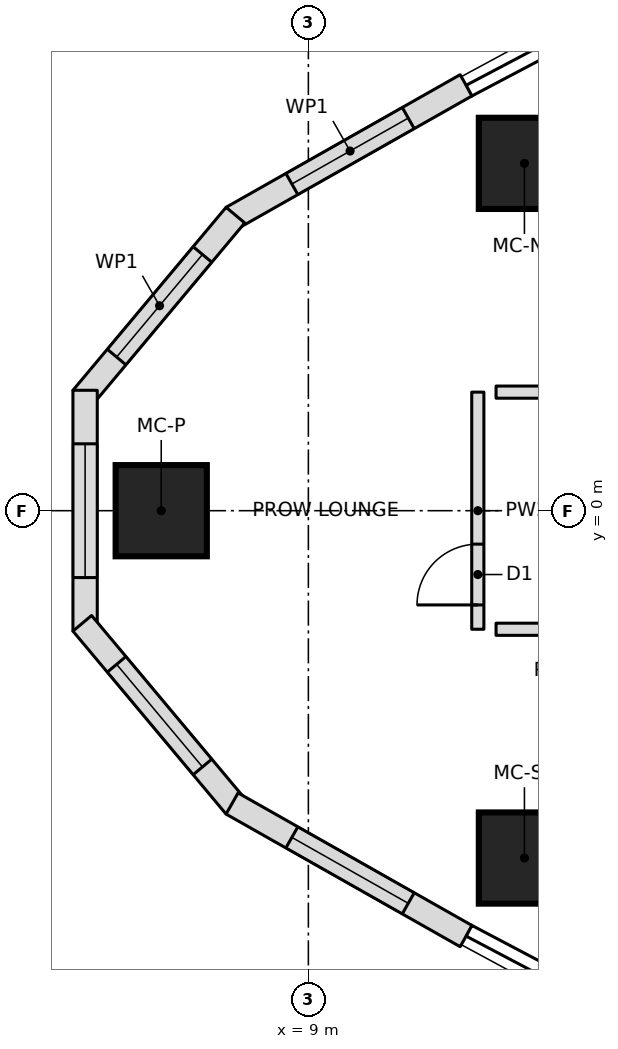
"""IFC4 building model, lengths in metres.
Left out: names, types, materials, properties, quantities, classifications, styles, units other than length and angle.
Written with IfcOpenShell. Run it as: python <this file> out.ifc"""

import sys

from ifc_helpers import new_model, si_unit, direction, frame, frame_2d, origin, origin_2d, place, context, subcontext, project, spatial, polyline, rectangle, outline, extrude, element, fill, save


model = new_model("IFC4")
c1 = context("Model", 3, precision=1e-05, world=origin(), true_north=direction((0.0, 1.0)))
c2 = subcontext(c1, "Body", "Model", "MODEL_VIEW")
j1 = project(units=[si_unit("LENGTHUNIT", "METRE"), si_unit("PLANEANGLEUNIT", "RADIAN")], contexts=[c1])
p1 = place(None, origin())
s1 = spatial("IfcSite", under=j1, at=p1, CompositionType="ELEMENT")
p2 = place(p1, origin())
s2 = spatial("IfcBuilding", under=s1, at=p2, CompositionType="ELEMENT")
p3 = place(p2, frame((0.0, 0.0, 158.6)))
s3 = spatial("IfcBuildingStorey", under=s2, at=p3, CompositionType="ELEMENT", Elevation=158.6)
for number, where, z_axis, x_axis in (
    (1, (6.58, 0.0, 0.0), (0.0, 0.0, 1.0), (1.0, 0.0, 0.0)),
    (2, (12.553, -5.713, 0.0), (0.0, 0.0, 1.0), (1.0, 0.0, 0.0)),
    (3, (12.553, 5.713, 0.0), (0.0, 0.0, 1.0), (1.0, 0.0, 0.0)),
):
    element("IfcColumn", number, at=place(p3, frame(where, z_axis=z_axis, x_axis=x_axis)), inside=s3, PredefinedType="COLUMN", context=c2, shape_type="SweptSolid", body=[
        extrude(rectangle(XDim=1.5, YDim=1.5, at=origin_2d()), origin(), (0.0, 0.0, 1.0), 3.55),
    ])
p4 = place(p3, frame((11.594, 6.997, 0.0), z_axis=(0.0, 0.0, 1.0), x_axis=(-0.870045255208, -0.492971859125, 0.0)))
e4 = element("IfcWall", 4, at=p4, inside=s3, PredefinedType="NOTDEFINED", context=c2, shape_type="SweptSolid", body=[
    extrude(outline(polyline([(0.0, -0.2), (4.424, -0.2), (4.352, 0.2), (0.0, 0.2), (0.0, -0.2)])), origin(), (0.0, 0.0, 1.0), 3.25),
])
p5 = place(p4, frame((1.094, 0.0, 0.6)))
e5 = element("IfcOpeningElement", 5, at=p5, cuts=e4, PredefinedType="OPENING", context=c2, shape_type="SweptSolid", body=[
    extrude(outline(polyline([(0.0, 1.35), (0.084, 1.771), (0.322, 2.128), (0.679, 2.366), (1.1, 2.45), (1.521, 2.366), (1.878, 2.128), (2.116, 1.771), (2.2, 1.35), (2.2, 1.1), (2.116, 0.679), (1.878, 0.322), (1.521, 0.084), (1.1, 0.0), (0.679, 0.084), (0.322, 0.322), (0.084, 0.679), (0.0, 1.1), (0.0, 1.35)])), frame((0.0, 0.21, 0.0), z_axis=(0.0, -1.0, 0.0), x_axis=(1.0, 0.0, 0.0)), (0.0, 0.0, 1.0), 0.42),
])
p6 = place(p3, frame((7.777, 4.834, 0.0), z_axis=(0.0, 0.0, 1.0), x_axis=(-0.641787918235, -0.766882173484, 0.0)))
e6 = element("IfcWall", 6, at=p6, inside=s3, PredefinedType="NOTDEFINED", context=c2, shape_type="SweptSolid", body=[
    extrude(outline(polyline([(-0.036, -0.2), (3.888, -0.2), (3.743, 0.2), (0.036, 0.2), (-0.036, -0.2)])), origin(), (0.0, 0.0, 1.0), 3.25),
])
p7 = place(p6, frame((0.808, 0.0, 0.6)))
e7 = element("IfcOpeningElement", 7, at=p7, cuts=e6, PredefinedType="OPENING", context=c2, shape_type="SweptSolid", body=[
    extrude(outline(polyline([(0.0, 1.35), (0.084, 1.771), (0.322, 2.128), (0.679, 2.366), (1.1, 2.45), (1.521, 2.366), (1.878, 2.128), (2.116, 1.771), (2.2, 1.35), (2.2, 1.1), (2.116, 0.679), (1.878, 0.322), (1.521, 0.084), (1.1, 0.0), (0.679, 0.084), (0.322, 0.322), (0.084, 0.679), (0.0, 1.1), (0.0, 1.35)])), frame((0.0, 0.21, 0.0), z_axis=(0.0, -1.0, 0.0), x_axis=(1.0, 0.0, 0.0)), (0.0, 0.0, 1.0), 0.42),
])
p8 = place(p3, frame((5.328, 1.908, 0.0), z_axis=(0.0, 0.0, 1.0), x_axis=(0.0, -1.0, 0.0)))
e8 = element("IfcWall", 8, at=p8, inside=s3, PredefinedType="NOTDEFINED", context=c2, shape_type="SweptSolid", body=[
    extrude(outline(polyline([(-0.073, -0.2), (3.888, -0.2), (3.743, 0.2), (0.073, 0.2), (-0.073, -0.2)])), origin(), (0.0, 0.0, 1.0), 3.25),
])
p9 = place(p8, frame((0.808, 0.0, 0.6)))
e9 = element("IfcOpeningElement", 9, at=p9, cuts=e8, PredefinedType="OPENING", context=c2, shape_type="SweptSolid", body=[
    extrude(outline(polyline([(0.0, 1.35), (0.084, 1.771), (0.322, 2.128), (0.679, 2.366), (1.1, 2.45), (1.521, 2.366), (1.878, 2.128), (2.116, 1.771), (2.2, 1.35), (2.2, 1.1), (2.116, 0.679), (1.878, 0.322), (1.521, 0.084), (1.1, 0.0), (0.679, 0.084), (0.322, 0.322), (0.084, 0.679), (0.0, 1.1), (0.0, 1.35)])), frame((0.0, 0.21, 0.0), z_axis=(0.0, -1.0, 0.0), x_axis=(1.0, 0.0, 0.0)), (0.0, 0.0, 1.0), 0.42),
])
p10 = place(p3, frame((5.328, -1.908, 0.0), z_axis=(0.0, 0.0, 1.0), x_axis=(0.641787918235, -0.766882173484, 0.0)))
e10 = element("IfcWall", 10, at=p10, inside=s3, PredefinedType="NOTDEFINED", context=c2, shape_type="SweptSolid", body=[
    extrude(outline(polyline([(-0.073, -0.2), (3.852, -0.2), (3.779, 0.2), (0.073, 0.2), (-0.073, -0.2)])), origin(), (0.0, 0.0, 1.0), 3.25),
])
p11 = place(p10, frame((0.808, 0.0, 0.6)))
e11 = element("IfcOpeningElement", 11, at=p11, cuts=e10, PredefinedType="OPENING", context=c2, shape_type="SweptSolid", body=[
    extrude(outline(polyline([(0.0, 1.35), (0.084, 1.771), (0.322, 2.128), (0.679, 2.366), (1.1, 2.45), (1.521, 2.366), (1.878, 2.128), (2.116, 1.771), (2.2, 1.35), (2.2, 1.1), (2.116, 0.679), (1.878, 0.322), (1.521, 0.084), (1.1, 0.0), (0.679, 0.084), (0.322, 0.322), (0.084, 0.679), (0.0, 1.1), (0.0, 1.35)])), frame((0.0, 0.21, 0.0), z_axis=(0.0, -1.0, 0.0), x_axis=(1.0, 0.0, 0.0)), (0.0, 0.0, 1.0), 0.42),
])
p12 = place(p3, frame((7.777, -4.834, 0.0), z_axis=(0.0, 0.0, 1.0), x_axis=(0.870045255208, -0.492971859125, 0.0)))
e12 = element("IfcWall", 12, at=p12, inside=s3, PredefinedType="NOTDEFINED", context=c2, shape_type="SweptSolid", body=[
    extrude(outline(polyline([(-0.036, -0.2), (4.388, -0.2), (4.388, 0.2), (0.036, 0.2), (-0.036, -0.2)])), origin(), (0.0, 0.0, 1.0), 3.25),
])
p13 = place(p12, frame((1.094, 0.0, 0.6)))
e13 = element("IfcOpeningElement", 13, at=p13, cuts=e12, PredefinedType="OPENING", context=c2, shape_type="SweptSolid", body=[
    extrude(outline(polyline([(0.0, 1.35), (0.084, 1.771), (0.322, 2.128), (0.679, 2.366), (1.1, 2.45), (1.521, 2.366), (1.878, 2.128), (2.116, 1.771), (2.2, 1.35), (2.2, 1.1), (2.116, 0.679), (1.878, 0.322), (1.521, 0.084), (1.1, 0.0), (0.679, 0.084), (0.322, 0.322), (0.084, 0.679), (0.0, 1.1), (0.0, 1.35)])), frame((0.0, 0.21, 0.0), z_axis=(0.0, -1.0, 0.0), x_axis=(1.0, 0.0, 0.0)), (0.0, 0.0, 1.0), 0.42),
])
p14 = place(p3, frame((12.087, 1.95, 0.0), z_axis=(0.0, 0.0, 1.0), x_axis=(1.0, 0.0, 0.0)))
e14 = element("IfcWall", 14, at=p14, inside=s3, PredefinedType="PARTITIONING", context=c2, shape_type="SweptSolid", body=[
    extrude(rectangle(XDim=3.372, YDim=0.2, at=frame_2d((1.686, 0.0))), origin(), (0.0, 0.0, 1.0), 3.25),
])
p15 = place(p14, frame((1.186, 0.0, 0.0)))
e15 = element("IfcOpeningElement", 15, at=p15, cuts=e14, PredefinedType="OPENING", context=c2, shape_type="SweptSolid", body=[
    extrude(rectangle(XDim=1.0, YDim=2.1, at=frame_2d((0.5, 1.05))), frame((0.0, 0.11, 0.0), z_axis=(0.0, -1.0, 0.0), x_axis=(1.0, 0.0, 0.0)), (0.0, 0.0, 1.0), 0.22),
])
p16 = place(p3, frame((12.087, -1.95, 0.0), z_axis=(0.0, 0.0, 1.0), x_axis=(1.0, 0.0, 0.0)))
e16 = element("IfcWall", 16, at=p16, inside=s3, PredefinedType="PARTITIONING", context=c2, shape_type="SweptSolid", body=[
    extrude(rectangle(XDim=3.372, YDim=0.2, at=frame_2d((1.686, 0.0))), origin(), (0.0, 0.0, 1.0), 3.25),
])
p17 = place(p16, frame((1.186, 0.0, 0.0)))
e17 = element("IfcOpeningElement", 17, at=p17, cuts=e16, PredefinedType="OPENING", context=c2, shape_type="SweptSolid", body=[
    extrude(rectangle(XDim=1.0, YDim=2.1, at=frame_2d((0.5, 1.05))), frame((0.0, 0.11, 0.0), z_axis=(0.0, -1.0, 0.0), x_axis=(1.0, 0.0, 0.0)), (0.0, 0.0, 1.0), 0.22),
])
p18 = place(p3, frame((11.787, -1.95, 0.0), z_axis=(0.0, 0.0, 1.0), x_axis=(0.0, 1.0, 0.0)))
e18 = element("IfcWall", 18, at=p18, inside=s3, PredefinedType="PARTITIONING", context=c2, shape_type="SweptSolid", body=[
    extrude(rectangle(XDim=3.9, YDim=0.2, at=frame_2d((1.95, 0.0))), origin(), (0.0, 0.0, 1.0), 3.25),
])
p19 = place(p18, frame((0.4, 0.0, 0.0)))
e19 = element("IfcOpeningElement", 19, at=p19, cuts=e18, PredefinedType="OPENING", context=c2, shape_type="SweptSolid", body=[
    extrude(rectangle(XDim=1.0, YDim=2.1, at=frame_2d((0.5, 1.05))), frame((0.0, 0.11, 0.0), z_axis=(0.0, -1.0, 0.0), x_axis=(1.0, 0.0, 0.0)), (0.0, 0.0, 1.0), 0.22),
])
p20 = place(p5, origin())
e20 = element("IfcWindow", 20, at=p20, inside=s3, PartitioningType="SINGLE_PANEL", PredefinedType="WINDOW", context=c2, shape_type="SweptSolid", body=[
    extrude(outline(polyline([(0.0, 1.35), (0.084, 1.771), (0.322, 2.128), (0.679, 2.366), (1.1, 2.45), (1.521, 2.366), (1.878, 2.128), (2.116, 1.771), (2.2, 1.35), (2.2, 1.1), (2.116, 0.679), (1.878, 0.322), (1.521, 0.084), (1.1, 0.0), (0.679, 0.084), (0.322, 0.322), (0.084, 0.679), (0.0, 1.1), (0.0, 1.35)])), frame((0.0, 0.17, 0.0), z_axis=(0.0, -1.0, 0.0), x_axis=(1.0, 0.0, 0.0)), (0.0, 0.0, 1.0), 0.06),
])
fill(e5, e20)
p21 = place(p7, origin())
e21 = element("IfcWindow", 21, at=p21, inside=s3, PartitioningType="SINGLE_PANEL", PredefinedType="WINDOW", context=c2, shape_type="SweptSolid", body=[
    extrude(outline(polyline([(0.0, 1.35), (0.084, 1.771), (0.322, 2.128), (0.679, 2.366), (1.1, 2.45), (1.521, 2.366), (1.878, 2.128), (2.116, 1.771), (2.2, 1.35), (2.2, 1.1), (2.116, 0.679), (1.878, 0.322), (1.521, 0.084), (1.1, 0.0), (0.679, 0.084), (0.322, 0.322), (0.084, 0.679), (0.0, 1.1), (0.0, 1.35)])), frame((0.0, 0.17, 0.0), z_axis=(0.0, -1.0, 0.0), x_axis=(1.0, 0.0, 0.0)), (0.0, 0.0, 1.0), 0.06),
])
fill(e7, e21)
p22 = place(p9, origin())
e22 = element("IfcWindow", 22, at=p22, inside=s3, PartitioningType="SINGLE_PANEL", PredefinedType="WINDOW", context=c2, shape_type="SweptSolid", body=[
    extrude(outline(polyline([(0.0, 1.35), (0.084, 1.771), (0.322, 2.128), (0.679, 2.366), (1.1, 2.45), (1.521, 2.366), (1.878, 2.128), (2.116, 1.771), (2.2, 1.35), (2.2, 1.1), (2.116, 0.679), (1.878, 0.322), (1.521, 0.084), (1.1, 0.0), (0.679, 0.084), (0.322, 0.322), (0.084, 0.679), (0.0, 1.1), (0.0, 1.35)])), frame((0.0, 0.17, 0.0), z_axis=(0.0, -1.0, 0.0), x_axis=(1.0, 0.0, 0.0)), (0.0, 0.0, 1.0), 0.06),
])
fill(e9, e22)
p23 = place(p11, origin())
e23 = element("IfcWindow", 23, at=p23, inside=s3, PartitioningType="SINGLE_PANEL", PredefinedType="WINDOW", context=c2, shape_type="SweptSolid", body=[
    extrude(outline(polyline([(0.0, 1.35), (0.084, 1.771), (0.322, 2.128), (0.679, 2.366), (1.1, 2.45), (1.521, 2.366), (1.878, 2.128), (2.116, 1.771), (2.2, 1.35), (2.2, 1.1), (2.116, 0.679), (1.878, 0.322), (1.521, 0.084), (1.1, 0.0), (0.679, 0.084), (0.322, 0.322), (0.084, 0.679), (0.0, 1.1), (0.0, 1.35)])), frame((0.0, 0.17, 0.0), z_axis=(0.0, -1.0, 0.0), x_axis=(1.0, 0.0, 0.0)), (0.0, 0.0, 1.0), 0.06),
])
fill(e11, e23)
p24 = place(p13, origin())
e24 = element("IfcWindow", 24, at=p24, inside=s3, PartitioningType="SINGLE_PANEL", PredefinedType="WINDOW", context=c2, shape_type="SweptSolid", body=[
    extrude(outline(polyline([(0.0, 1.35), (0.084, 1.771), (0.322, 2.128), (0.679, 2.366), (1.1, 2.45), (1.521, 2.366), (1.878, 2.128), (2.116, 1.771), (2.2, 1.35), (2.2, 1.1), (2.116, 0.679), (1.878, 0.322), (1.521, 0.084), (1.1, 0.0), (0.679, 0.084), (0.322, 0.322), (0.084, 0.679), (0.0, 1.1), (0.0, 1.35)])), frame((0.0, 0.17, 0.0), z_axis=(0.0, -1.0, 0.0), x_axis=(1.0, 0.0, 0.0)), (0.0, 0.0, 1.0), 0.06),
])
fill(e13, e24)
p25 = place(p19, origin())
e25 = element("IfcDoor", 25, at=p25, inside=s3, OperationType="SINGLE_SWING_LEFT", PredefinedType="DOOR", context=c2, shape_type="SweptSolid", body=[
    extrude(rectangle(XDim=1.0, YDim=2.1, at=frame_2d((0.5, 1.05))), frame((0.0, 0.025, 0.0), z_axis=(0.0, -1.0, 0.0), x_axis=(1.0, 0.0, 0.0)), (0.0, 0.0, 1.0), 0.05),
])
fill(e19, e25)
save(model, sys.argv[1])
